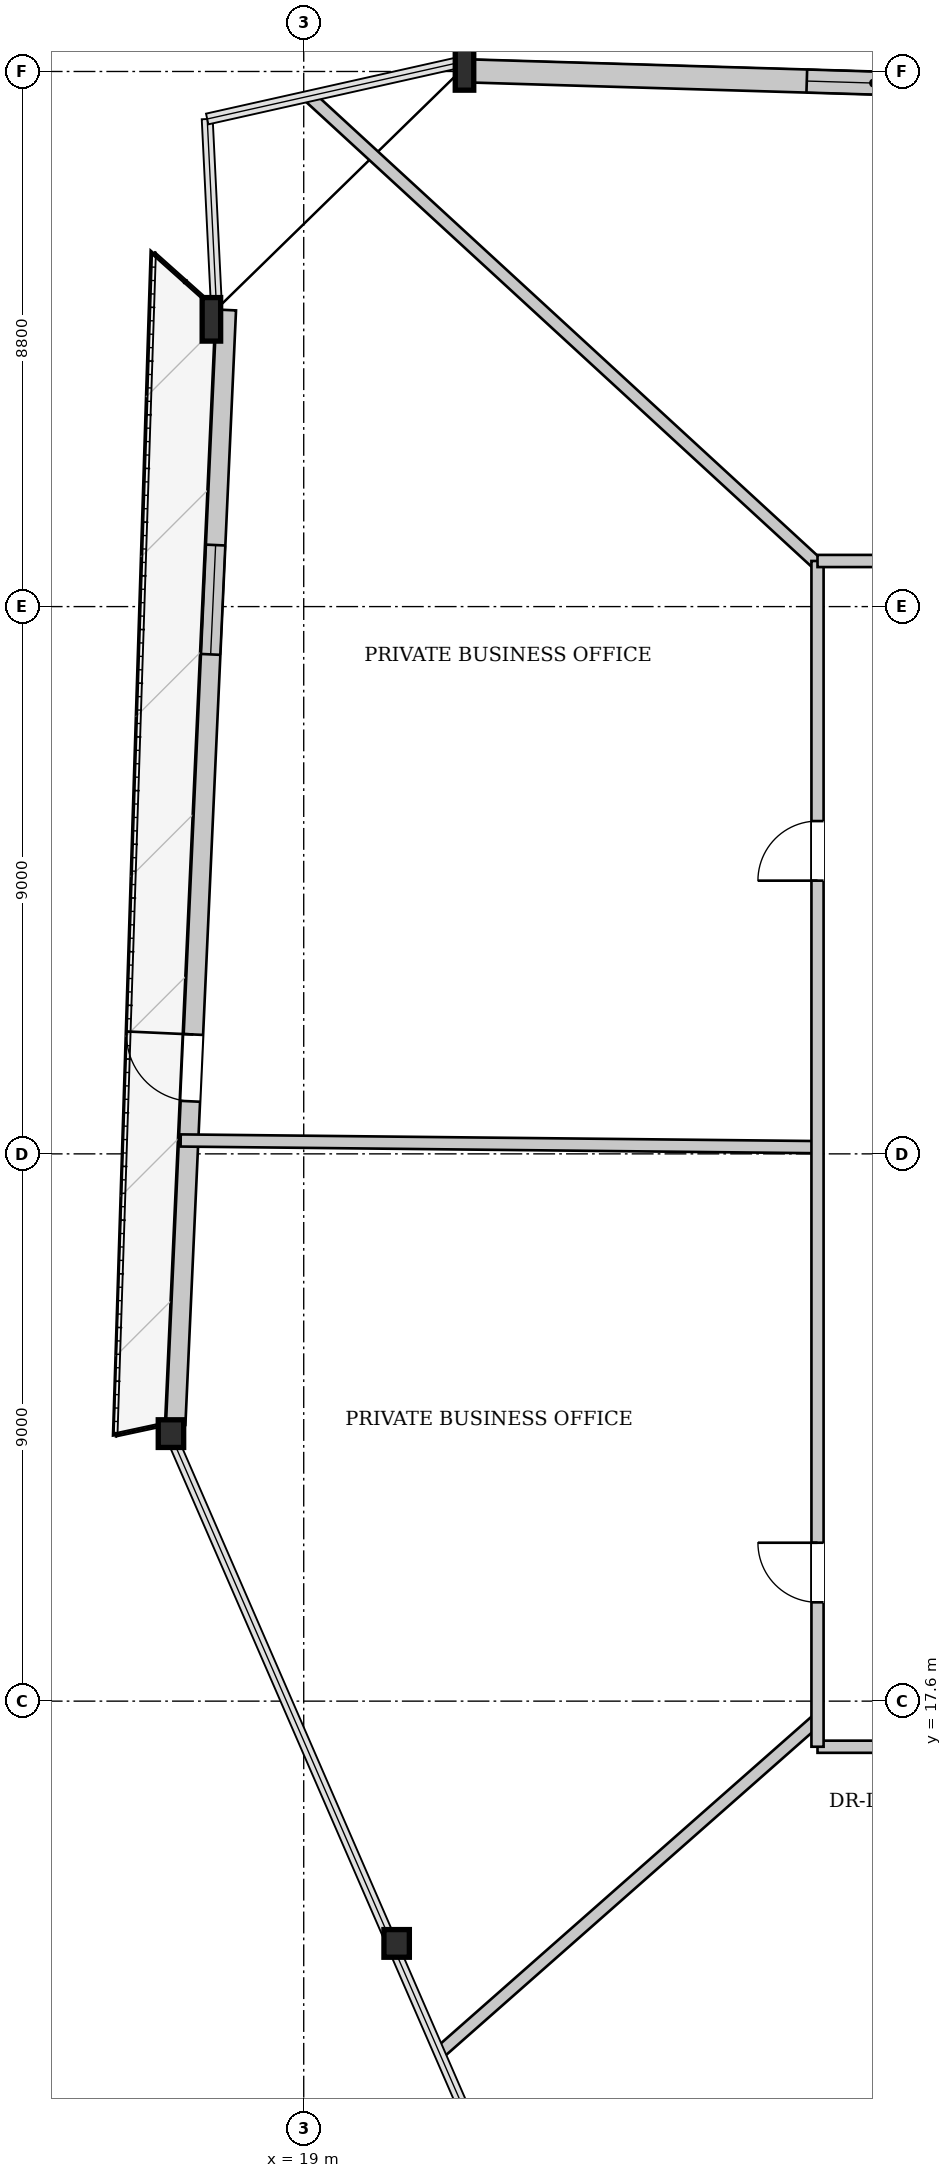
"""IFC4 building model, lengths in metres.
Left out: names, types, materials, properties, quantities, classifications, styles, units other than length and angle.
Written with IfcOpenShell. Run it as: python <this file> out.ifc"""

import sys

from ifc_helpers import new_model, si_unit, direction, frame, frame_2d, origin, origin_2d, place, context, subcontext, project, spatial, rectangle, i_section, extrude, source, transform, mapped, element, fill, save


model = new_model("IFC4")
c1 = context("Model", 3, precision=1e-05, world=origin(), true_north=direction((0.0, 1.0)))
c2 = subcontext(c1, "Body", "Model", "MODEL_VIEW")
j1 = project(units=[si_unit("LENGTHUNIT", "METRE"), si_unit("PLANEANGLEUNIT", "RADIAN")], contexts=[c1])
p1 = place(None, origin())
s1 = spatial("IfcSite", under=j1, at=p1, CompositionType="ELEMENT")
p2 = place(p1, origin())
s2 = spatial("IfcBuilding", under=s1, at=p2, CompositionType="ELEMENT")
p3 = place(p2, frame((0.0, 0.0, 84.4)))
s3 = spatial("IfcBuildingStorey", under=s2, at=p3, CompositionType="ELEMENT", Elevation=84.4)
m1 = source(origin(), c2, "Body", "SweptSolid", [
    extrude(i_section(OverallWidth=0.304, OverallDepth=0.716, WebThickness=0.021, FlangeThickness=0.04, at=origin_2d()), origin(), (0.0, 0.0, 1.0), 3.409),
])
p4 = place(p3, frame((21.781, 44.598, 0.0), z_axis=(-0.080144098224, -0.086446761891, 0.993027633492), x_axis=(0.733334244993, -0.679868285126, 0.0)))
e1 = element("IfcColumn", 1, at=p4, inside=s3, PredefinedType="COLUMN", context=c2, shape_type="MappedRepresentation", body=[
    mapped(m1, transform((0.0, 0.0, 0.0), x_axis=(1.0, 0.0, 0.0), y_axis=(0.0, 1.0, 0.0), z_axis=(0.0, 0.0, 1.0), scale=1.0)),
])
m2 = source(origin(), c2, "Body", "SweptSolid", [
    extrude(i_section(OverallWidth=0.304, OverallDepth=0.716, WebThickness=0.021, FlangeThickness=0.04, at=origin_2d()), origin(), (0.0, 0.0, 1.0), 3.405),
])
p5 = place(p3, frame((17.567, 40.485, 0.0), z_axis=(-0.050124012866, -0.094798204591, 0.99423381744), x_axis=(0.884031784185, -0.467426790579, 0.0)))
e2 = element("IfcColumn", 2, at=p5, inside=s3, PredefinedType="COLUMN", context=c2, shape_type="MappedRepresentation", body=[
    mapped(m2, transform((0.0, 0.0, 0.0), x_axis=(1.0, 0.0, 0.0), y_axis=(0.0, 1.0, 0.0), z_axis=(0.0, 0.0, 1.0), scale=1.0)),
])
m3 = source(origin(), c2, "Body", "SweptSolid", [
    extrude(i_section(OverallWidth=0.418, OverallDepth=0.455, WebThickness=0.038, FlangeThickness=0.059, at=origin_2d()), origin(), (0.0, 0.0, 1.0), 3.404),
])
p6 = place(p3, frame((16.734, 22.156, 0.0), z_axis=(0.048347568134, -0.092176001561, 0.994568296997), x_axis=(0.885575109811, 0.464496205457, 0.0)))
e3 = element("IfcColumn", 3, at=p6, inside=s3, PredefinedType="COLUMN", context=c2, shape_type="MappedRepresentation", body=[
    mapped(m3, transform((0.0, 0.0, 0.0), x_axis=(1.0, 0.0, 0.0), y_axis=(0.0, 1.0, 0.0), z_axis=(0.0, 0.0, 1.0), scale=1.0)),
])
m4 = source(origin(), c2, "Body", "SweptSolid", [
    extrude(i_section(OverallWidth=0.418, OverallDepth=0.455, WebThickness=0.038, FlangeThickness=0.059, at=origin_2d()), origin(), (0.0, 0.0, 1.0), 3.405),
])
p7 = place(p3, frame((20.393, 13.743, 0.0), z_axis=(0.079506863503, -0.07491855037, 0.994015024769), x_axis=(0.685794461716, 0.727795270855, 0.0)))
e4 = element("IfcColumn", 4, at=p7, inside=s3, PredefinedType="COLUMN", context=c2, shape_type="MappedRepresentation", body=[
    mapped(m4, transform((0.0, 0.0, 0.0), x_axis=(1.0, 0.0, 0.0), y_axis=(0.0, 1.0, 0.0), z_axis=(0.0, 0.0, 1.0), scale=1.0)),
])
p8 = place(p3, frame((16.894, 22.149, 0.0), z_axis=(0.0, 0.0, 1.0), x_axis=(0.045387139322, 0.998969472799, 0.0)))
e5 = element("IfcWall", 5, at=p8, inside=s3, PredefinedType="SOLIDWALL", context=c2, shape_type="SweptSolid", body=[
    extrude(rectangle(XDim=18.348, YDim=0.32, at=frame_2d((9.174, 0.0))), origin(), (0.0, 0.0, 1.0), 2.692),
])
p9 = place(p8, frame((5.321, 0.0, 0.0)))
e6 = element("IfcOpeningElement", 6, at=p9, cuts=e5, PredefinedType="OPENING", context=c2, shape_type="SweptSolid", body=[
    extrude(rectangle(XDim=1.1, YDim=2.3, at=frame_2d((0.55, 1.15))), frame((0.0, 0.17, 0.0), z_axis=(0.0, -1.0, 0.0), x_axis=(1.0, 0.0, 0.0)), (0.0, 0.0, 1.0), 0.34),
])
p10 = place(p8, frame((12.678, 0.0, 0.372)))
e7 = element("IfcOpeningElement", 7, at=p10, cuts=e5, PredefinedType="OPENING", context=c2, shape_type="SweptSolid", body=[
    extrude(rectangle(XDim=1.8, YDim=2.2, at=frame_2d((0.9, 1.1))), frame((0.0, 0.17, 0.0), z_axis=(0.0, -1.0, 0.0), x_axis=(1.0, 0.0, 0.0)), (0.0, 0.0, 1.0), 0.34),
])
p11 = place(p3, frame((21.775, 44.408, 0.0), z_axis=(0.0, 0.0, 1.0), x_axis=(0.999548013015, -0.030062762319, 0.0)))
e8 = element("IfcWall", 8, at=p11, inside=s3, PredefinedType="SOLIDWALL", context=c2, shape_type="SweptSolid", body=[
    extrude(rectangle(XDim=23.575, YDim=0.38, at=frame_2d((11.788, 0.0))), origin(), (0.0, 0.0, 1.0), 2.692),
])
p12 = place(p11, frame((5.501, 0.0, 0.322)))
e9 = element("IfcOpeningElement", 9, at=p12, cuts=e8, PredefinedType="OPENING", context=c2, shape_type="SweptSolid", body=[
    extrude(rectangle(XDim=2.2, YDim=2.25, at=frame_2d((1.1, 1.125))), frame((0.0, 0.2, 0.0), z_axis=(0.0, -1.0, 0.0), x_axis=(1.0, 0.0, 0.0)), (0.0, 0.0, 1.0), 0.4),
])
p13 = place(p11, frame((15.874, 0.0, 0.322)))
e10 = element("IfcOpeningElement", 10, at=p13, cuts=e8, PredefinedType="OPENING", context=c2, shape_type="SweptSolid", body=[
    extrude(rectangle(XDim=2.2, YDim=2.25, at=frame_2d((1.1, 1.125))), frame((0.0, 0.2, 0.0), z_axis=(0.0, -1.0, 0.0), x_axis=(1.0, 0.0, 0.0)), (0.0, 0.0, 1.0), 0.4),
])
p14 = place(p3, frame((27.45, 36.301, 0.0), z_axis=(0.0, 0.0, 1.0), x_axis=(-0.736099373834, 0.676873482891, 0.0)))
e11 = element("IfcWall", 11, at=p14, inside=s3, PredefinedType="PARTITIONING", context=c2, shape_type="SweptSolid", body=[
    extrude(rectangle(XDim=11.328, YDim=0.2, at=frame_2d((5.664, 0.0))), origin(), (0.0, 0.0, 1.0), 2.795),
])
p15 = place(p3, frame((27.45, 26.71, 0.0), z_axis=(0.0, 0.0, 1.0), x_axis=(-0.999944992189, 0.010488688993, 0.0)))
e12 = element("IfcWall", 12, at=p15, inside=s3, PredefinedType="PARTITIONING", context=c2, shape_type="SweptSolid", body=[
    extrude(rectangle(XDim=10.474, YDim=0.2, at=frame_2d((5.237, 0.0))), origin(), (0.0, 0.0, 1.0), 3.3),
])
p16 = place(p3, frame((27.45, 17.299, 0.0), z_axis=(0.0, 0.0, 1.0), x_axis=(-0.750110386314, -0.661312640393, 0.0)))
e13 = element("IfcWall", 13, at=p16, inside=s3, PredefinedType="PARTITIONING", context=c2, shape_type="SweptSolid", body=[
    extrude(rectangle(XDim=8.259, YDim=0.2, at=frame_2d((4.13, 0.0))), origin(), (0.0, 0.0, 1.0), 3.3),
])
p17 = place(p3, frame((27.45, 16.85, 0.0), z_axis=(0.0, 0.0, 1.0), x_axis=(1.0, 0.0, 0.0)))
e14 = element("IfcWall", 14, at=p17, inside=s3, PredefinedType="PARTITIONING", context=c2, shape_type="SweptSolid", body=[
    extrude(rectangle(XDim=21.1, YDim=0.2, at=frame_2d((10.55, 0.0))), origin(), (0.0, 0.0, 1.0), 3.3),
])
p18 = place(p17, frame((1.399, 0.0, 0.0)))
e15 = element("IfcOpeningElement", 15, at=p18, cuts=e14, PredefinedType="OPENING", context=c2, shape_type="SweptSolid", body=[
    extrude(rectangle(XDim=0.98, YDim=2.15, at=frame_2d((0.49, 1.075))), frame((0.0, 0.11, 0.0), z_axis=(0.0, -1.0, 0.0), x_axis=(1.0, 0.0, 0.0)), (0.0, 0.0, 1.0), 0.22),
])
p19 = place(p17, frame((11.767, 0.0, 0.0)))
e16 = element("IfcOpeningElement", 16, at=p19, cuts=e14, PredefinedType="OPENING", context=c2, shape_type="SweptSolid", body=[
    extrude(rectangle(XDim=0.98, YDim=2.15, at=frame_2d((0.49, 1.075))), frame((0.0, 0.11, 0.0), z_axis=(0.0, -1.0, 0.0), x_axis=(1.0, 0.0, 0.0)), (0.0, 0.0, 1.0), 0.22),
])
p20 = place(p3, frame((27.45, 16.85, 0.0), z_axis=(0.0, 0.0, 1.0), x_axis=(0.0, 1.0, 0.0)))
e17 = element("IfcWall", 17, at=p20, inside=s3, PredefinedType="PARTITIONING", context=c2, shape_type="SweptSolid", body=[
    extrude(rectangle(XDim=19.5, YDim=0.2, at=frame_2d((9.75, 0.0))), origin(), (0.0, 0.0, 1.0), 3.3),
])
p21 = place(p20, frame((14.243, 0.0, 0.0)))
e18 = element("IfcOpeningElement", 18, at=p21, cuts=e17, PredefinedType="OPENING", context=c2, shape_type="SweptSolid", body=[
    extrude(rectangle(XDim=0.98, YDim=2.15, at=frame_2d((0.49, 1.075))), frame((0.0, 0.11, 0.0), z_axis=(0.0, -1.0, 0.0), x_axis=(1.0, 0.0, 0.0)), (0.0, 0.0, 1.0), 0.22),
])
p22 = place(p20, frame((2.375, 0.0, 0.0)))
e19 = element("IfcOpeningElement", 19, at=p22, cuts=e17, PredefinedType="OPENING", context=c2, shape_type="SweptSolid", body=[
    extrude(rectangle(XDim=0.98, YDim=2.15, at=frame_2d((0.49, 1.075))), frame((0.0, 0.11, 0.0), z_axis=(0.0, -1.0, 0.0), x_axis=(1.0, 0.0, 0.0)), (0.0, 0.0, 1.0), 0.22),
])
p23 = place(p3, frame((27.45, 36.35, 0.0), z_axis=(0.0, 0.0, 1.0), x_axis=(1.0, 0.0, 0.0)))
e20 = element("IfcWall", 20, at=p23, inside=s3, PredefinedType="PARTITIONING", context=c2, shape_type="SweptSolid", body=[
    extrude(rectangle(XDim=21.1, YDim=0.2, at=frame_2d((10.55, 0.0))), origin(), (0.0, 0.0, 1.0), 3.3),
])
p24 = place(p23, frame((2.092, 0.0, 0.0)))
e21 = element("IfcOpeningElement", 21, at=p24, cuts=e20, PredefinedType="OPENING", context=c2, shape_type="SweptSolid", body=[
    extrude(rectangle(XDim=0.98, YDim=2.15, at=frame_2d((0.49, 1.075))), frame((0.0, 0.11, 0.0), z_axis=(0.0, -1.0, 0.0), x_axis=(1.0, 0.0, 0.0)), (0.0, 0.0, 1.0), 0.22),
])
p25 = place(p23, frame((19.82, 0.0, 0.0)))
e22 = element("IfcOpeningElement", 22, at=p25, cuts=e20, PredefinedType="OPENING", context=c2, shape_type="SweptSolid", body=[
    extrude(rectangle(XDim=0.98, YDim=2.15, at=frame_2d((0.49, 1.075))), frame((0.0, 0.11, 0.0), z_axis=(0.0, -1.0, 0.0), x_axis=(1.0, 0.0, 0.0)), (0.0, 0.0, 1.0), 0.22),
])
p26 = place(p23, frame((12.032, 0.0, 0.0)))
e23 = element("IfcOpeningElement", 23, at=p26, cuts=e20, PredefinedType="OPENING", context=c2, shape_type="SweptSolid", body=[
    extrude(rectangle(XDim=0.98, YDim=2.15, at=frame_2d((0.49, 1.075))), frame((0.0, 0.11, 0.0), z_axis=(0.0, -1.0, 0.0), x_axis=(1.0, 0.0, 0.0)), (0.0, 0.0, 1.0), 0.22),
])
m5 = source(origin(), c2, "Body", "SweptSolid", [
    extrude(rectangle(XDim=1.1, YDim=2.3, at=frame_2d((0.55, 1.15))), frame((0.0, 0.025, 0.0), z_axis=(0.0, -1.0, 0.0), x_axis=(1.0, 0.0, 0.0)), (0.0, 0.0, 1.0), 0.05),
])
p27 = place(p9, origin())
e24 = element("IfcDoor", 24, at=p27, inside=s3, OperationType="SINGLE_SWING_RIGHT", PredefinedType="DOOR", context=c2, shape_type="MappedRepresentation", body=[
    mapped(m5, transform((0.0, 0.0, 0.0), x_axis=(1.0, 0.0, 0.0), y_axis=(0.0, 1.0, 0.0), z_axis=(0.0, 0.0, 1.0), scale=1.0)),
])
fill(e6, e24)
m6 = source(origin(), c2, "Body", "SweptSolid", [
    extrude(rectangle(XDim=1.8, YDim=2.2, at=frame_2d((0.9, 1.1))), frame((0.0, 0.03, 0.0), z_axis=(0.0, -1.0, 0.0), x_axis=(1.0, 0.0, 0.0)), (0.0, 0.0, 1.0), 0.06),
])
p28 = place(p10, origin())
e25 = element("IfcWindow", 25, at=p28, inside=s3, PartitioningType="SINGLE_PANEL", PredefinedType="WINDOW", context=c2, shape_type="MappedRepresentation", body=[
    mapped(m6, transform((0.0, 0.0, 0.0), x_axis=(1.0, 0.0, 0.0), y_axis=(0.0, 1.0, 0.0), z_axis=(0.0, 0.0, 1.0), scale=1.0)),
])
fill(e7, e25)
m7 = source(origin(), c2, "Body", "SweptSolid", [
    extrude(rectangle(XDim=2.2, YDim=2.25, at=frame_2d((1.1, 1.125))), frame((0.0, 0.03, 0.0), z_axis=(0.0, -1.0, 0.0), x_axis=(1.0, 0.0, 0.0)), (0.0, 0.0, 1.0), 0.06),
])
p29 = place(p12, origin())
e26 = element("IfcWindow", 26, at=p29, inside=s3, PartitioningType="SINGLE_PANEL", PredefinedType="WINDOW", context=c2, shape_type="MappedRepresentation", body=[
    mapped(m7, transform((0.0, 0.0, 0.0), x_axis=(1.0, 0.0, 0.0), y_axis=(0.0, 1.0, 0.0), z_axis=(0.0, 0.0, 1.0), scale=1.0)),
])
fill(e9, e26)
m8 = source(origin(), c2, "Body", "SweptSolid", [
    extrude(rectangle(XDim=0.98, YDim=2.15, at=frame_2d((0.49, 1.075))), frame((0.0, 0.025, 0.0), z_axis=(0.0, -1.0, 0.0), x_axis=(1.0, 0.0, 0.0)), (0.0, 0.0, 1.0), 0.05),
])
p30 = place(p21, origin())
e27 = element("IfcDoor", 27, at=p30, inside=s3, OperationType="SINGLE_SWING_LEFT", PredefinedType="DOOR", context=c2, shape_type="MappedRepresentation", body=[
    mapped(m8, transform((0.0, 0.0, 0.0), x_axis=(1.0, 0.0, 0.0), y_axis=(0.0, 1.0, 0.0), z_axis=(0.0, 0.0, 1.0), scale=1.0)),
])
fill(e18, e27)
p31 = place(p22, origin())
e28 = element("IfcDoor", 28, at=p31, inside=s3, OperationType="SINGLE_SWING_RIGHT", PredefinedType="DOOR", context=c2, shape_type="MappedRepresentation", body=[
    mapped(m8, transform((0.0, 0.0, 0.0), x_axis=(1.0, 0.0, 0.0), y_axis=(0.0, 1.0, 0.0), z_axis=(0.0, 0.0, 1.0), scale=1.0)),
])
fill(e19, e28)
save(model, sys.argv[1])
